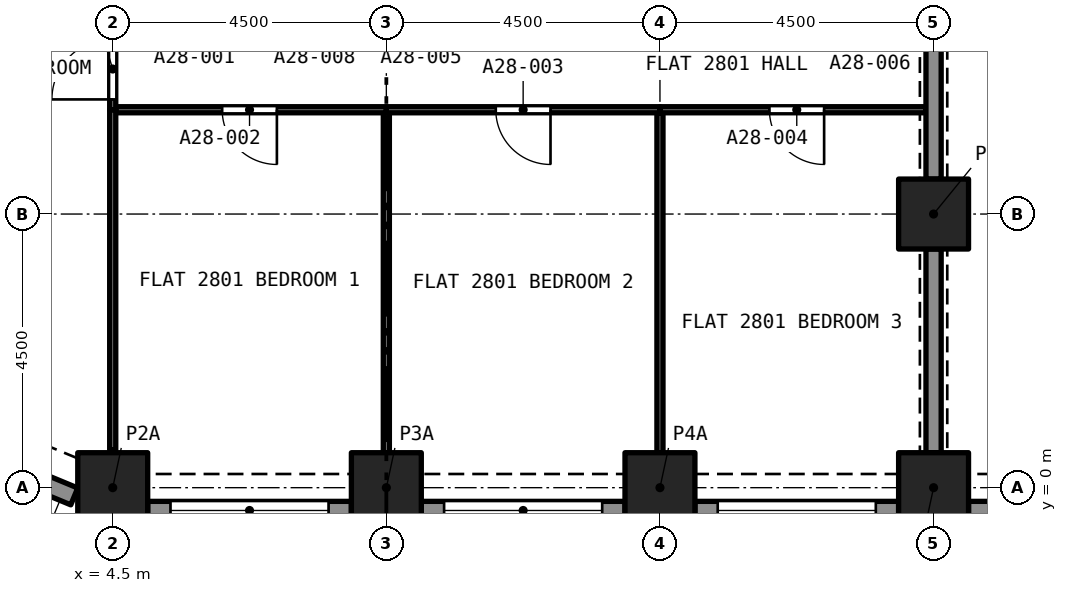
"""IFC4 building model, lengths in metres.
Left out: names, types, materials, properties, quantities, classifications, styles, units other than length and angle.
Written with IfcOpenShell. Run it as: python <this file> out.ifc"""

import sys

from ifc_helpers import new_model, si_unit, direction, frame, frame_2d, origin, origin_2d, place, context, subcontext, project, spatial, rectangle, extrude, element, fill, save


model = new_model("IFC4")
c1 = context("Model", 3, precision=1e-05, world=origin(), true_north=direction((0.0, 1.0)))
c2 = subcontext(c1, "Body", "Model", "MODEL_VIEW")
j1 = project(units=[si_unit("LENGTHUNIT", "METRE"), si_unit("PLANEANGLEUNIT", "RADIAN")], contexts=[c1])
p1 = place(None, origin())
s1 = spatial("IfcSite", under=j1, at=p1, CompositionType="ELEMENT")
p2 = place(p1, origin())
s2 = spatial("IfcBuilding", under=s1, at=p2, CompositionType="ELEMENT")
p3 = place(p2, frame((0.0, 0.0, 102.4)))
s3 = spatial("IfcBuildingStorey", under=s2, at=p3, CompositionType="ELEMENT", Elevation=102.4)
for number, where, z_axis, x_axis in (
    (1, (4.5, 0.0, 0.0), (0.0, 0.0, 1.0), (1.0, 0.0, 0.0)),
    (2, (9.0, 0.0, 0.0), (0.0, 0.0, 1.0), (1.0, 0.0, 0.0)),
    (3, (13.5, 0.0, 0.0), (0.0, 0.0, 1.0), (1.0, 0.0, 0.0)),
    (4, (18.0, 0.0, 0.0), (0.0, 0.0, 1.0), (1.0, 0.0, 0.0)),
    (5, (18.0, 4.5, 0.0), (0.0, 0.0, 1.0), (1.0, 0.0, 0.0)),
):
    element("IfcColumn", number, at=place(p3, frame(where, z_axis=z_axis, x_axis=x_axis)), inside=s3, PredefinedType="COLUMN", context=c2, shape_type="SweptSolid", body=[
        extrude(rectangle(XDim=1.15, YDim=1.15, at=origin_2d()), origin(), (0.0, 0.0, 1.0), 3.2),
    ])
p4 = place(p3, frame((3.868, -0.144, 0.0), z_axis=(0.0, 0.0, 1.0), x_axis=(-0.923862802911, 0.382723818695, 0.0)))
e6 = element("IfcWall", 6, at=p4, inside=s3, PredefinedType="SOLIDWALL", context=c2, shape_type="SweptSolid", body=[
    extrude(rectangle(XDim=2.164, YDim=0.3, at=frame_2d((1.082, 0.0))), origin(), (0.0, 0.0, 1.0), 3.2),
])
p5 = place(p4, frame((0.493, 0.0, 0.45)))
e7 = element("IfcOpeningElement", 7, at=p5, cuts=e6, PredefinedType="OPENING", context=c2, shape_type="SweptSolid", body=[
    extrude(rectangle(XDim=1.4, YDim=1.95, at=frame_2d((0.7, 0.975))), frame((0.0, 0.16, 0.0), z_axis=(0.0, -1.0, 0.0), x_axis=(1.0, 0.0, 0.0)), (0.0, 0.0, 1.0), 0.32),
])
p6 = place(p3, frame((8.425, -0.375, 0.0), z_axis=(0.0, 0.0, 1.0), x_axis=(-1.0, 0.0, 0.0)))
e8 = element("IfcWall", 8, at=p6, inside=s3, PredefinedType="SOLIDWALL", context=c2, shape_type="SweptSolid", body=[
    extrude(rectangle(XDim=3.35, YDim=0.3, at=frame_2d((1.675, 0.0))), origin(), (0.0, 0.0, 1.0), 3.2),
])
p7 = place(p6, frame((0.375, 0.0, 0.45)))
e9 = element("IfcOpeningElement", 9, at=p7, cuts=e8, PredefinedType="OPENING", context=c2, shape_type="SweptSolid", body=[
    extrude(rectangle(XDim=2.6, YDim=1.95, at=frame_2d((1.3, 0.975))), frame((0.0, 0.16, 0.0), z_axis=(0.0, -1.0, 0.0), x_axis=(1.0, 0.0, 0.0)), (0.0, 0.0, 1.0), 0.32),
])
p8 = place(p3, frame((12.925, -0.375, 0.0), z_axis=(0.0, 0.0, 1.0), x_axis=(-1.0, 0.0, 0.0)))
e10 = element("IfcWall", 10, at=p8, inside=s3, PredefinedType="SOLIDWALL", context=c2, shape_type="SweptSolid", body=[
    extrude(rectangle(XDim=3.35, YDim=0.3, at=frame_2d((1.675, 0.0))), origin(), (0.0, 0.0, 1.0), 3.2),
])
p9 = place(p8, frame((0.375, 0.0, 0.45)))
e11 = element("IfcOpeningElement", 11, at=p9, cuts=e10, PredefinedType="OPENING", context=c2, shape_type="SweptSolid", body=[
    extrude(rectangle(XDim=2.6, YDim=1.95, at=frame_2d((1.3, 0.975))), frame((0.0, 0.16, 0.0), z_axis=(0.0, -1.0, 0.0), x_axis=(1.0, 0.0, 0.0)), (0.0, 0.0, 1.0), 0.32),
])
p10 = place(p3, frame((17.425, -0.375, 0.0), z_axis=(0.0, 0.0, 1.0), x_axis=(-1.0, 0.0, 0.0)))
e12 = element("IfcWall", 12, at=p10, inside=s3, PredefinedType="SOLIDWALL", context=c2, shape_type="SweptSolid", body=[
    extrude(rectangle(XDim=3.35, YDim=0.3, at=frame_2d((1.675, 0.0))), origin(), (0.0, 0.0, 1.0), 3.2),
])
p11 = place(p10, frame((0.375, 0.0, 0.45)))
e13 = element("IfcOpeningElement", 13, at=p11, cuts=e12, PredefinedType="OPENING", context=c2, shape_type="SweptSolid", body=[
    extrude(rectangle(XDim=2.6, YDim=1.95, at=frame_2d((1.3, 0.975))), frame((0.0, 0.16, 0.0), z_axis=(0.0, -1.0, 0.0), x_axis=(1.0, 0.0, 0.0)), (0.0, 0.0, 1.0), 0.32),
])
p12 = place(p3, frame((21.925, -0.375, 0.0), z_axis=(0.0, 0.0, 1.0), x_axis=(-1.0, 0.0, 0.0)))
e14 = element("IfcWall", 14, at=p12, inside=s3, PredefinedType="SOLIDWALL", context=c2, shape_type="SweptSolid", body=[
    extrude(rectangle(XDim=3.35, YDim=0.3, at=frame_2d((1.675, 0.0))), origin(), (0.0, 0.0, 1.0), 3.2),
])
p13 = place(p12, frame((0.375, 0.0, 0.45)))
e15 = element("IfcOpeningElement", 15, at=p13, cuts=e14, PredefinedType="OPENING", context=c2, shape_type="SweptSolid", body=[
    extrude(rectangle(XDim=2.6, YDim=1.95, at=frame_2d((1.3, 0.975))), frame((0.0, 0.16, 0.0), z_axis=(0.0, -1.0, 0.0), x_axis=(1.0, 0.0, 0.0)), (0.0, 0.0, 1.0), 0.32),
])
p14 = place(p3, frame((9.0, 0.575, 0.0), z_axis=(0.0, 0.0, 1.0), x_axis=(0.0, 1.0, 0.0)))
e16 = element("IfcWall", 16, at=p14, inside=s3, PredefinedType="PARTITIONING", context=c2, shape_type="SweptSolid", body=[
    extrude(rectangle(XDim=5.59, YDim=0.1, at=frame_2d((2.795, 0.0))), origin(), (0.0, 0.0, 1.0), 2.9),
])
p15 = place(p3, frame((9.0, 6.215, 0.0), z_axis=(0.0, 0.0, 1.0), x_axis=(-1.0, 0.0, 0.0)))
e17 = element("IfcWall", 17, at=p15, inside=s3, PredefinedType="PARTITIONING", context=c2, shape_type="SweptSolid", body=[
    extrude(rectangle(XDim=4.45, YDim=0.1, at=frame_2d((2.225, 0.0))), origin(), (0.0, 0.0, 1.0), 2.9),
])
p16 = place(p15, frame((1.8, 0.0, 0.0)))
e18 = element("IfcOpeningElement", 18, at=p16, cuts=e17, PredefinedType="OPENING", context=c2, shape_type="SweptSolid", body=[
    extrude(rectangle(XDim=0.9, YDim=2.1, at=frame_2d((0.45, 1.05))), frame((0.0, 0.06, 0.0), z_axis=(0.0, -1.0, 0.0), x_axis=(1.0, 0.0, 0.0)), (0.0, 0.0, 1.0), 0.12),
])
p17 = place(p3, frame((4.5, 0.622, 0.0), z_axis=(0.0, 0.0, 1.0), x_axis=(0.0, 1.0, 0.0)))
e19 = element("IfcWall", 19, at=p17, inside=s3, PredefinedType="PARTITIONING", context=c2, shape_type="SweptSolid", body=[
    extrude(rectangle(XDim=5.593, YDim=0.1, at=frame_2d((2.796, 0.0))), origin(), (0.0, 0.0, 1.0), 2.9),
])
p18 = place(p3, frame((13.5, 0.575, 0.0), z_axis=(0.0, 0.0, 1.0), x_axis=(0.0, 1.0, 0.0)))
e20 = element("IfcWall", 20, at=p18, inside=s3, PredefinedType="PARTITIONING", context=c2, shape_type="SweptSolid", body=[
    extrude(rectangle(XDim=5.59, YDim=0.1, at=frame_2d((2.795, 0.0))), origin(), (0.0, 0.0, 1.0), 2.9),
])
p19 = place(p3, frame((13.5, 6.215, 0.0), z_axis=(0.0, 0.0, 1.0), x_axis=(-1.0, 0.0, 0.0)))
e21 = element("IfcWall", 21, at=p19, inside=s3, PredefinedType="PARTITIONING", context=c2, shape_type="SweptSolid", body=[
    extrude(rectangle(XDim=4.5, YDim=0.1, at=frame_2d((2.25, 0.0))), origin(), (0.0, 0.0, 1.0), 2.9),
])
p20 = place(p19, frame((1.8, 0.0, 0.0)))
e22 = element("IfcOpeningElement", 22, at=p20, cuts=e21, PredefinedType="OPENING", context=c2, shape_type="SweptSolid", body=[
    extrude(rectangle(XDim=0.9, YDim=2.1, at=frame_2d((0.45, 1.05))), frame((0.0, 0.06, 0.0), z_axis=(0.0, -1.0, 0.0), x_axis=(1.0, 0.0, 0.0)), (0.0, 0.0, 1.0), 0.12),
])
p21 = place(p3, frame((17.875, 6.215, 0.0), z_axis=(0.0, 0.0, 1.0), x_axis=(-1.0, 0.0, 0.0)))
e23 = element("IfcWall", 23, at=p21, inside=s3, PredefinedType="PARTITIONING", context=c2, shape_type="SweptSolid", body=[
    extrude(rectangle(XDim=4.375, YDim=0.1, at=frame_2d((2.188, 0.0))), origin(), (0.0, 0.0, 1.0), 2.9),
])
p22 = place(p21, frame((1.675, 0.0, 0.0)))
e24 = element("IfcOpeningElement", 24, at=p22, cuts=e23, PredefinedType="OPENING", context=c2, shape_type="SweptSolid", body=[
    extrude(rectangle(XDim=0.9, YDim=2.1, at=frame_2d((0.45, 1.05))), frame((0.0, 0.06, 0.0), z_axis=(0.0, -1.0, 0.0), x_axis=(1.0, 0.0, 0.0)), (0.0, 0.0, 1.0), 0.12),
])
for number, where, z_axis, x_axis in (
    (25, (18.0, 5.075, 0.0), (0.0, 0.0, 1.0), (0.0, 1.0, 0.0)),
    (26, (18.0, 0.575, 0.0), (0.0, 0.0, 1.0), (0.0, 1.0, 0.0)),
):
    element("IfcWall", number, at=place(p3, frame(where, z_axis=z_axis, x_axis=x_axis)), inside=s3, PredefinedType="PARTITIONING", context=c2, shape_type="SweptSolid", body=[
        extrude(rectangle(XDim=3.35, YDim=0.25, at=frame_2d((1.675, 0.0))), origin(), (0.0, 0.0, 1.0), 2.38),
    ])
p23 = place(p3, frame((4.5, 6.215, 0.0), z_axis=(0.0, 0.0, 1.0), x_axis=(0.0, 1.0, 0.0)))
e27 = element("IfcWall", 27, at=p23, inside=s3, PredefinedType="PARTITIONING", context=c2, shape_type="SweptSolid", body=[
    extrude(rectangle(XDim=1.34, YDim=0.1, at=frame_2d((0.67, 0.0))), origin(), (0.0, 0.0, 1.0), 2.9),
])
p24 = place(p23, frame((0.17, 0.0, 0.0)))
e28 = element("IfcOpeningElement", 28, at=p24, cuts=e27, PredefinedType="OPENING", context=c2, shape_type="SweptSolid", body=[
    extrude(rectangle(XDim=1.0, YDim=2.1, at=frame_2d((0.5, 1.05))), frame((0.0, 0.06, 0.0), z_axis=(0.0, -1.0, 0.0), x_axis=(1.0, 0.0, 0.0)), (0.0, 0.0, 1.0), 0.12),
])
p25 = place(p7, origin())
e29 = element("IfcWindow", 29, at=p25, inside=s3, PartitioningType="SINGLE_PANEL", PredefinedType="WINDOW", context=c2, shape_type="SweptSolid", body=[
    extrude(rectangle(XDim=2.6, YDim=1.95, at=frame_2d((1.3, 0.975))), frame((0.0, 0.03, 0.0), z_axis=(0.0, -1.0, 0.0), x_axis=(1.0, 0.0, 0.0)), (0.0, 0.0, 1.0), 0.06),
])
fill(e9, e29)
p26 = place(p9, origin())
e30 = element("IfcWindow", 30, at=p26, inside=s3, PartitioningType="SINGLE_PANEL", PredefinedType="WINDOW", context=c2, shape_type="SweptSolid", body=[
    extrude(rectangle(XDim=2.6, YDim=1.95, at=frame_2d((1.3, 0.975))), frame((0.0, 0.03, 0.0), z_axis=(0.0, -1.0, 0.0), x_axis=(1.0, 0.0, 0.0)), (0.0, 0.0, 1.0), 0.06),
])
fill(e11, e30)
p27 = place(p11, origin())
e31 = element("IfcWindow", 31, at=p27, inside=s3, PartitioningType="SINGLE_PANEL", PredefinedType="WINDOW", context=c2, shape_type="SweptSolid", body=[
    extrude(rectangle(XDim=2.6, YDim=1.95, at=frame_2d((1.3, 0.975))), frame((0.0, 0.03, 0.0), z_axis=(0.0, -1.0, 0.0), x_axis=(1.0, 0.0, 0.0)), (0.0, 0.0, 1.0), 0.06),
])
fill(e13, e31)
p28 = place(p16, origin())
e32 = element("IfcDoor", 32, at=p28, inside=s3, OperationType="SINGLE_SWING_RIGHT", PredefinedType="DOOR", context=c2, shape_type="SweptSolid", body=[
    extrude(rectangle(XDim=0.9, YDim=2.1, at=frame_2d((0.45, 1.05))), frame((0.0, 0.025, 0.0), z_axis=(0.0, -1.0, 0.0), x_axis=(1.0, 0.0, 0.0)), (0.0, 0.0, 1.0), 0.05),
])
fill(e18, e32)
p29 = place(p20, origin())
e33 = element("IfcDoor", 33, at=p29, inside=s3, OperationType="SINGLE_SWING_LEFT", PredefinedType="DOOR", context=c2, shape_type="SweptSolid", body=[
    extrude(rectangle(XDim=0.9, YDim=2.1, at=frame_2d((0.45, 1.05))), frame((0.0, 0.025, 0.0), z_axis=(0.0, -1.0, 0.0), x_axis=(1.0, 0.0, 0.0)), (0.0, 0.0, 1.0), 0.05),
])
fill(e22, e33)
p30 = place(p22, origin())
e34 = element("IfcDoor", 34, at=p30, inside=s3, OperationType="SINGLE_SWING_LEFT", PredefinedType="DOOR", context=c2, shape_type="SweptSolid", body=[
    extrude(rectangle(XDim=0.9, YDim=2.1, at=frame_2d((0.45, 1.05))), frame((0.0, 0.025, 0.0), z_axis=(0.0, -1.0, 0.0), x_axis=(1.0, 0.0, 0.0)), (0.0, 0.0, 1.0), 0.05),
])
fill(e24, e34)
p31 = place(p24, origin())
e35 = element("IfcDoor", 35, at=p31, inside=s3, OperationType="SINGLE_SWING_RIGHT", PredefinedType="DOOR", context=c2, shape_type="SweptSolid", body=[
    extrude(rectangle(XDim=1.0, YDim=2.1, at=frame_2d((0.5, 1.05))), frame((0.0, 0.025, 0.0), z_axis=(0.0, -1.0, 0.0), x_axis=(1.0, 0.0, 0.0)), (0.0, 0.0, 1.0), 0.05),
])
fill(e28, e35)
save(model, sys.argv[1])
